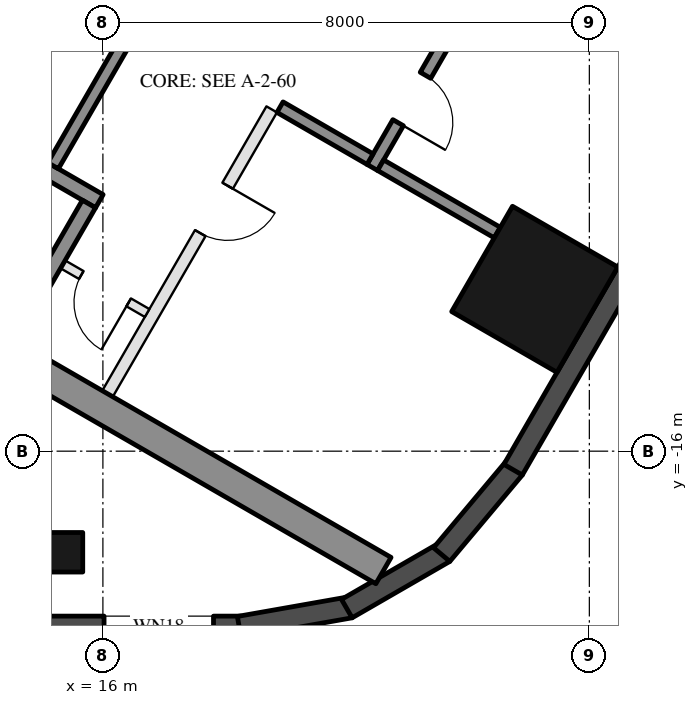
"""IFC4 building model, lengths in metres.
Left out: names, types, materials, properties, quantities, classifications, styles, units other than length and angle.
Written with IfcOpenShell. Run it as: python <this file> out.ifc"""

import sys

from ifc_helpers import new_model, si_unit, direction, frame, frame_2d, origin, origin_2d, place, context, subcontext, project, spatial, rectangle, hollow_rectangle, extrude, boolean, halfspace, element, fill, save


model = new_model("IFC4")
c1 = context("Model", 3, precision=1e-05, world=origin(), true_north=direction((0.0, 1.0)))
c2 = subcontext(c1, "Body", "Model", "MODEL_VIEW")
j1 = project(units=[si_unit("LENGTHUNIT", "METRE"), si_unit("PLANEANGLEUNIT", "RADIAN")], contexts=[c1])
p1 = place(None, origin())
s1 = spatial("IfcSite", under=j1, at=p1, CompositionType="ELEMENT")
p2 = place(p1, origin())
s2 = spatial("IfcBuilding", under=s1, at=p2, CompositionType="ELEMENT")
p3 = place(p2, frame((0.0, 0.0, 257.8)))
s3 = spatial("IfcBuildingStorey", under=s2, at=p3, CompositionType="ELEMENT", Elevation=257.8)
p4 = place(p3, frame((15.344, -17.663, 0.0), z_axis=(0.0, 0.0, 1.0), x_axis=(-1.0, 0.0, 0.0)))
e1 = element("IfcColumn", 1, at=p4, inside=s3, PredefinedType="COLUMN", context=c2, shape_type="SweptSolid", body=[
    boolean("DIFFERENCE", extrude(hollow_rectangle(XDim=0.65, YDim=0.65, WallThickness=0.03, at=origin_2d()), origin(), (0.0, 0.0, 1.0), 3.7), halfspace(frame((0.0, 0.0, 0.047), z_axis=(0.0, 0.0, 1.0), x_axis=(1.0, 0.0, 0.0)), True)),
])
p5 = place(p3, frame((23.102, -13.338, 0.0), z_axis=(0.0, 0.0, 1.0), x_axis=(0.5, 0.866025403784, 0.0)))
e2 = element("IfcColumn", 2, at=p5, inside=s3, PredefinedType="COLUMN", context=c2, shape_type="SweptSolid", body=[
    boolean("DIFFERENCE", extrude(hollow_rectangle(XDim=2.0, YDim=2.0, WallThickness=0.05, at=origin_2d()), origin(), (0.0, 0.0, 1.0), 3.7), halfspace(frame((0.0, 0.0, 0.112), z_axis=(0.0, 0.0, 1.0), x_axis=(1.0, 0.0, 0.0)), True)),
])
p6 = place(p3, frame((14.444, -18.888, 0.0), z_axis=(0.0, 0.0, 1.0), x_axis=(1.0, 0.0, 0.0)))
e3 = element("IfcWall", 3, at=p6, inside=s3, PredefinedType="SOLIDWALL", context=c2, shape_type="SweptSolid", body=[
    extrude(rectangle(XDim=3.829, YDim=0.35, at=frame_2d((1.914, 0.0))), origin(), (0.0, 0.0, 1.0), 3.55),
])
p7 = place(p6, frame((1.575, 0.0, 0.3)))
e4 = element("IfcOpeningElement", 4, at=p7, cuts=e3, PredefinedType="OPENING", context=c2, shape_type="SweptSolid", body=[
    extrude(rectangle(XDim=1.8, YDim=2.65, at=frame_2d((0.9, 1.325))), frame((0.0, 0.185, 0.0), z_axis=(0.0, -1.0, 0.0), x_axis=(1.0, 0.0, 0.0)), (0.0, 0.0, 1.0), 0.37),
])
p8 = place(p3, frame((18.242, -18.891, 0.0), z_axis=(0.0, 0.0, 1.0), x_axis=(0.984791508075, 0.173740282098, 0.0)))
e5 = element("IfcWall", 5, at=p8, inside=s3, PredefinedType="SOLIDWALL", context=c2, shape_type="SweptSolid", body=[
    extrude(rectangle(XDim=1.855, YDim=0.35, at=frame_2d((0.927, 0.0))), origin(), (0.0, 0.0, 1.0), 3.55),
])
for number, where, z_axis, x_axis in (
    (6, (20.011, -18.589, 0.0), (0.0, 0.0, 1.0), (0.866, 0.5, 0.0)),
    (7, (21.572, -17.701, 0.0), (0.0, 0.0, 1.0), (0.643, 0.766, 0.0)),
):
    element("IfcWall", number, at=place(p3, frame(where, z_axis=z_axis, x_axis=x_axis)), inside=s3, PredefinedType="SOLIDWALL", context=c2, shape_type="SweptSolid", body=[
        extrude(rectangle(XDim=1.855, YDim=0.35, at=frame_2d((0.927, 0.0))), origin(), (0.0, 0.0, 1.0), 3.55),
    ])
p9 = place(p3, frame((22.746, -16.305, 0.0), z_axis=(0.0, 0.0, 1.0), x_axis=(0.500028854569, 0.86600874395, 0.0)))
e8 = element("IfcWall", 8, at=p9, inside=s3, PredefinedType="SOLIDWALL", context=c2, shape_type="SweptSolid", body=[
    extrude(rectangle(XDim=5.495, YDim=0.35, at=frame_2d((2.748, 0.0))), origin(), (0.0, 0.0, 1.0), 3.55),
])
p10 = place(p3, frame((8.547, -10.997, 0.0), z_axis=(0.0, 0.0, 1.0), x_axis=(0.86602744543, -0.49999646375, 0.0)))
e9 = element("IfcWall", 9, at=p10, inside=s3, PredefinedType="SHEAR", context=c2, shape_type="SweptSolid", body=[
    extrude(rectangle(XDim=13.934, YDim=0.5, at=frame_2d((6.967, 0.0))), origin(), (0.0, 0.0, 1.0), 3.5),
])
p11 = place(p3, frame((10.356, -8.664, 0.0), z_axis=(0.0, 0.0, 1.0), x_axis=(0.866028629588, -0.499994412703, 0.0)))
e10 = element("IfcWall", 10, at=p11, inside=s3, PredefinedType="SHEAR", context=c2, shape_type="SweptSolid", body=[
    extrude(rectangle(XDim=6.45, YDim=0.25, at=frame_2d((3.225, 0.0))), origin(), (0.0, 0.0, 1.0), 3.5),
])
p12 = place(p11, frame((0.3, 0.0, 0.0)))
e11 = element("IfcOpeningElement", 11, at=p12, cuts=e10, PredefinedType="OPENING", context=c2, shape_type="SweptSolid", body=[
    extrude(rectangle(XDim=1.0, YDim=2.1, at=frame_2d((0.5, 1.05))), frame((0.0, 0.135, 0.0), z_axis=(0.0, -1.0, 0.0), x_axis=(1.0, 0.0, 0.0)), (0.0, 0.0, 1.0), 0.27),
])
p13 = place(p3, frame((14.496, -14.143, 0.0), z_axis=(0.0, 0.0, 1.0), x_axis=(0.500062241894, 0.865989465428, 0.0)))
e12 = element("IfcWall", 12, at=p13, inside=s3, PredefinedType="SHEAR", context=c2, shape_type="SweptSolid", body=[
    extrude(rectangle(XDim=2.55, YDim=0.25, at=frame_2d((1.275, 0.0))), origin(), (0.0, 0.0, 1.0), 3.5),
])
p14 = place(p3, frame((15.181, -11.305, 0.0), z_axis=(0.0, 0.0, 1.0), x_axis=(0.49994636267, 0.866056369097, 0.0)))
e13 = element("IfcWall", 13, at=p14, inside=s3, PredefinedType="SHEAR", context=c2, shape_type="SweptSolid", body=[
    extrude(rectangle(XDim=2.8, YDim=0.2, at=frame_2d((1.4, 0.0))), origin(), (0.0, 0.0, 1.0), 3.5),
])
p15 = place(p3, frame((20.43, -11.333, 0.0), z_axis=(0.0, 0.0, 1.0), x_axis=(0.500001309137, 0.866024647952, 0.0)))
e14 = element("IfcWall", 14, at=p15, inside=s3, PredefinedType="SHEAR", context=c2, shape_type="SweptSolid", body=[
    extrude(rectangle(XDim=2.4, YDim=0.2, at=frame_2d((1.2, 0.0))), origin(), (0.0, 0.0, 1.0), 3.5),
])
p16 = place(p15, frame((0.85, 0.0, 0.0)))
e15 = element("IfcOpeningElement", 15, at=p16, cuts=e14, PredefinedType="OPENING", context=c2, shape_type="SweptSolid", body=[
    extrude(rectangle(XDim=0.9, YDim=2.1, at=frame_2d((0.45, 1.05))), frame((0.0, 0.11, 0.0), z_axis=(0.0, -1.0, 0.0), x_axis=(1.0, 0.0, 0.0)), (0.0, 0.0, 1.0), 0.22),
])
p17 = place(p3, frame((18.913, -10.342, 0.0), z_axis=(0.0, 0.0, 1.0), x_axis=(0.866038183914, -0.499977863513, 0.0)))
e16 = element("IfcWall", 16, at=p17, inside=s3, PredefinedType="SHEAR", context=c2, shape_type="SweptSolid", body=[
    extrude(rectangle(XDim=1.71, YDim=0.2, at=frame_2d((0.855, 0.0))), origin(), (0.0, 0.0, 1.0), 3.5),
])
p18 = place(p3, frame((20.567, -11.297, 0.0), z_axis=(0.0, 0.0, 1.0), x_axis=(0.866079196458, -0.49990681678, 0.0)))
e17 = element("IfcWall", 17, at=p18, inside=s3, PredefinedType="SHEAR", context=c2, shape_type="SweptSolid", body=[
    extrude(rectangle(XDim=2.216, YDim=0.2, at=frame_2d((1.108, 0.0))), origin(), (0.0, 0.0, 1.0), 3.5),
])
p19 = place(p3, frame((16.076, -15.055, 0.0), z_axis=(0.0, 0.0, 1.0), x_axis=(0.499995103361, 0.866028230842, 0.0)))
e18 = element("IfcWall", 18, at=p19, inside=s3, PredefinedType="PARTITIONING", context=c2, shape_type="SweptSolid", body=[
    extrude(rectangle(XDim=5.4, YDim=0.2, at=frame_2d((2.7, 0.0))), origin(), (0.0, 0.0, 1.0), 3.5),
])
p20 = place(p19, frame((3.05, 0.0, 0.0)))
e19 = element("IfcOpeningElement", 19, at=p20, cuts=e18, PredefinedType="OPENING", context=c2, shape_type="SweptSolid", body=[
    extrude(rectangle(XDim=0.9, YDim=2.1, at=frame_2d((0.45, 1.05))), frame((0.0, 0.11, 0.0), z_axis=(0.0, -1.0, 0.0), x_axis=(1.0, 0.0, 0.0)), (0.0, 0.0, 1.0), 0.22),
])
p21 = place(p3, frame((15.342, -12.928, 0.0), z_axis=(0.0, 0.0, 1.0), x_axis=(0.865989903783, -0.500061482766, 0.0)))
e20 = element("IfcWall", 20, at=p21, inside=s3, PredefinedType="PARTITIONING", context=c2, shape_type="SweptSolid", body=[
    extrude(rectangle(XDim=1.6, YDim=0.15, at=frame_2d((0.8, 0.0))), origin(), (0.0, 0.0, 1.0), 3.5),
])
p22 = place(p21, frame((0.35, 0.0, 0.0)))
e21 = element("IfcOpeningElement", 21, at=p22, cuts=e20, PredefinedType="OPENING", context=c2, shape_type="SweptSolid", body=[
    extrude(rectangle(XDim=0.9, YDim=2.1, at=frame_2d((0.45, 1.05))), frame((0.0, 0.085, 0.0), z_axis=(0.0, -1.0, 0.0), x_axis=(1.0, 0.0, 0.0)), (0.0, 0.0, 1.0), 0.17),
])
p23 = place(p22, frame((0.9, 0.0, 0.0), z_axis=(0.0, 0.0, 1.0), x_axis=(-1.0, 0.0, 0.0)))
e22 = element("IfcDoor", 22, at=p23, inside=s3, OperationType="SINGLE_SWING_LEFT", PredefinedType="DOOR", context=c2, shape_type="SweptSolid", body=[
    extrude(rectangle(XDim=0.9, YDim=2.1, at=frame_2d((0.45, 1.05))), frame((0.0, 0.025, 0.0), z_axis=(0.0, -1.0, 0.0), x_axis=(1.0, 0.0, 0.0)), (0.0, 0.0, 1.0), 0.05),
])
fill(e21, e22)
p24 = place(p16, frame((0.9, 0.0, 0.0), z_axis=(0.0, 0.0, 1.0), x_axis=(-1.0, 0.0, 0.0)))
e23 = element("IfcDoor", 23, at=p24, inside=s3, OperationType="SINGLE_SWING_RIGHT", PredefinedType="DOOR", context=c2, shape_type="SweptSolid", body=[
    extrude(rectangle(XDim=0.9, YDim=2.1, at=frame_2d((0.45, 1.05))), frame((0.0, 0.025, 0.0), z_axis=(0.0, -1.0, 0.0), x_axis=(1.0, 0.0, 0.0)), (0.0, 0.0, 1.0), 0.05),
])
fill(e15, e23)
p25 = place(p20, frame((0.9, 0.0, 0.0), z_axis=(0.0, 0.0, 1.0), x_axis=(-1.0, 0.0, 0.0)))
e24 = element("IfcDoor", 24, at=p25, inside=s3, OperationType="SINGLE_SWING_LEFT", PredefinedType="DOOR", context=c2, shape_type="SweptSolid", body=[
    extrude(rectangle(XDim=0.9, YDim=2.1, at=frame_2d((0.45, 1.05))), frame((0.0, 0.025, 0.0), z_axis=(0.0, -1.0, 0.0), x_axis=(1.0, 0.0, 0.0)), (0.0, 0.0, 1.0), 0.05),
])
fill(e19, e24)
save(model, sys.argv[1])
